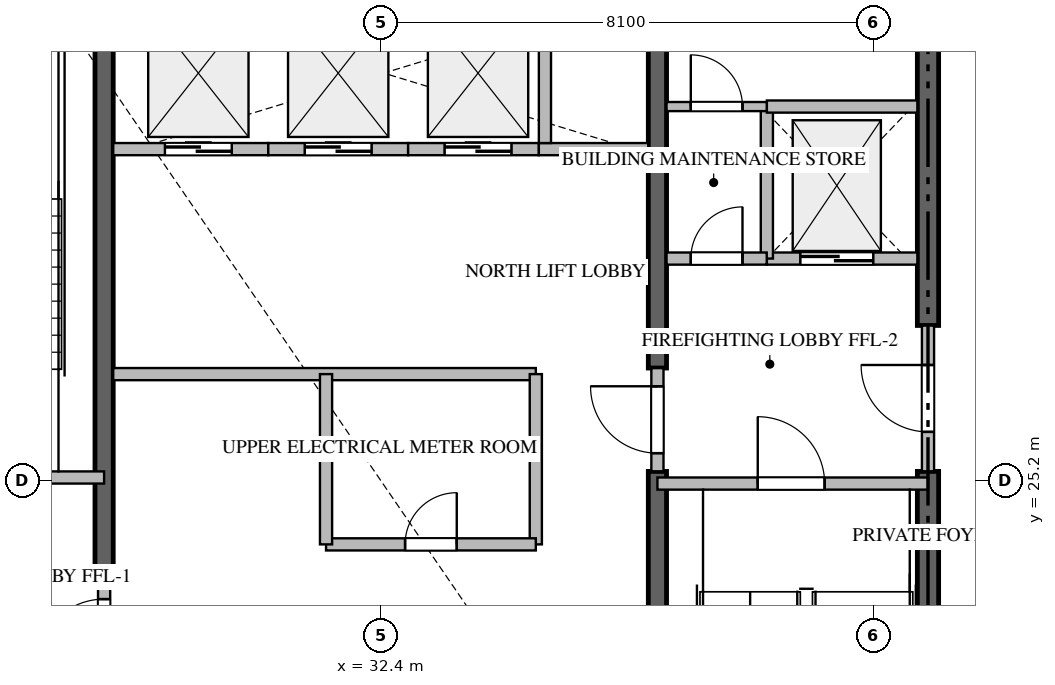
"""IFC4 building model, lengths in metres.
Left out: names, types, materials, properties, quantities, classifications, styles, units other than length and angle.
Written with IfcOpenShell. Run it as: python <this file> out.ifc"""

import sys

from ifc_helpers import new_model, si_unit, direction, frame, frame_2d, origin, place, context, subcontext, project, spatial, rectangle, extrude, source, transform, mapped, element, fill, save


model = new_model("IFC4")
c1 = context("Model", 3, precision=1e-05, world=origin(), true_north=direction((0.0, 1.0)))
c2 = subcontext(c1, "Body", "Model", "MODEL_VIEW")
j1 = project(units=[si_unit("LENGTHUNIT", "METRE"), si_unit("PLANEANGLEUNIT", "RADIAN")], contexts=[c1])
p1 = place(None, origin())
s1 = spatial("IfcSite", under=j1, at=p1, CompositionType="ELEMENT")
p2 = place(p1, origin())
s2 = spatial("IfcBuilding", under=s1, at=p2, CompositionType="ELEMENT")
p3 = place(p2, frame((0.0, 0.0, 321.8)))
s3 = spatial("IfcBuildingStorey", under=s2, at=p3, CompositionType="ELEMENT", Elevation=321.8)
p4 = place(p3, frame((41.4, 16.975, -0.26), z_axis=(0.0, 0.0, 1.0), x_axis=(0.0, 1.0, 0.0)))
e1 = element("IfcWall", 1, at=p4, inside=s3, PredefinedType="SHEAR", context=c2, shape_type="SweptSolid", body=[
    extrude(rectangle(XDim=8.375, YDim=0.35, at=frame_2d((4.188, 0.0))), origin(), (0.0, 0.0, 1.0), 4.048),
])
p5 = place(p3, frame((41.4, 27.75, -0.26), z_axis=(0.0, 0.0, 1.0), x_axis=(0.0, 1.0, 0.0)))
e2 = element("IfcWall", 2, at=p5, inside=s3, PredefinedType="SHEAR", context=c2, shape_type="SweptSolid", body=[
    extrude(rectangle(XDim=5.675, YDim=0.35, at=frame_2d((2.837, 0.0))), origin(), (0.0, 0.0, 1.0), 4.048),
])
p6 = place(p3, frame((27.85, 23.55, -0.26), z_axis=(0.0, 0.0, 1.0), x_axis=(0.0, 1.0, 0.0)))
e3 = element("IfcWall", 3, at=p6, inside=s3, PredefinedType="SHEAR", context=c2, shape_type="SweptSolid", body=[
    extrude(rectangle(XDim=9.875, YDim=0.3, at=frame_2d((4.938, 0.0))), origin(), (0.0, 0.0, 1.0), 4.048),
])
p7 = place(p3, frame((36.95, 16.975, -0.26), z_axis=(0.0, 0.0, 1.0), x_axis=(0.0, 1.0, 0.0)))
e4 = element("IfcWall", 4, at=p7, inside=s3, PredefinedType="SHEAR", context=c2, shape_type="SweptSolid", body=[
    extrude(rectangle(XDim=8.375, YDim=0.3, at=frame_2d((4.188, 0.0))), origin(), (0.0, 0.0, 1.0), 4.048),
])
p8 = place(p3, frame((36.95, 27.05, -0.26), z_axis=(0.0, 0.0, 1.0), x_axis=(0.0, 1.0, 0.0)))
e5 = element("IfcWall", 5, at=p8, inside=s3, PredefinedType="SHEAR", context=c2, shape_type="SweptSolid", body=[
    extrude(rectangle(XDim=6.375, YDim=0.3, at=frame_2d((3.188, 0.0))), origin(), (0.0, 0.0, 1.0), 4.048),
])
p9 = place(p3, frame((23.4, 25.25, 0.0), z_axis=(0.0, 0.0, 1.0), x_axis=(1.0, 0.0, 0.0)))
e6 = element("IfcWall", 6, at=p9, inside=s3, PredefinedType="STANDARD", context=c2, shape_type="SweptSolid", body=[
    extrude(rectangle(XDim=4.45, YDim=0.2, at=frame_2d((2.225, 0.0))), origin(), (0.0, 0.0, 1.0), 3.79),
])
p10 = place(p9, frame((1.65, 0.0, 0.0)))
e7 = element("IfcOpeningElement", 7, at=p10, cuts=e6, PredefinedType="OPENING", context=c2, shape_type="SweptSolid", body=[
    extrude(rectangle(XDim=1.1, YDim=2.15, at=frame_2d((0.55, 1.075))), frame((0.0, 0.11, 0.0), z_axis=(0.0, -1.0, 0.0), x_axis=(1.0, 0.0, 0.0)), (0.0, 0.0, 1.0), 0.22),
])
p11 = place(p3, frame((36.95, 25.15, 0.0), z_axis=(0.0, 0.0, 1.0), x_axis=(1.0, 0.0, 0.0)))
e8 = element("IfcWall", 8, at=p11, inside=s3, PredefinedType="STANDARD", context=c2, shape_type="SweptSolid", body=[
    extrude(rectangle(XDim=4.45, YDim=0.2, at=frame_2d((2.225, 0.0))), origin(), (0.0, 0.0, 1.0), 3.79),
])
p12 = place(p11, frame((1.65, 0.0, 0.0)))
e9 = element("IfcOpeningElement", 9, at=p12, cuts=e8, PredefinedType="OPENING", context=c2, shape_type="SweptSolid", body=[
    extrude(rectangle(XDim=1.1, YDim=2.15, at=frame_2d((0.55, 1.075))), frame((0.0, 0.11, 0.0), z_axis=(0.0, -1.0, 0.0), x_axis=(1.0, 0.0, 0.0)), (0.0, 0.0, 1.0), 0.22),
])
p13 = place(p3, frame((38.75, 28.85, 0.0), z_axis=(0.0, 0.0, 1.0), x_axis=(1.0, 0.0, 0.0)))
e10 = element("IfcWall", 10, at=p13, inside=s3, PredefinedType="STANDARD", context=c2, shape_type="SweptSolid", body=[
    extrude(rectangle(XDim=2.475, YDim=0.2, at=frame_2d((1.238, 0.0))), origin(), (0.0, 0.0, 1.0), 3.79),
])
p14 = place(p13, frame((0.55, 0.0, 0.0)))
e11 = element("IfcOpeningElement", 11, at=p14, cuts=e10, PredefinedType="OPENING", context=c2, shape_type="SweptSolid", body=[
    extrude(rectangle(XDim=1.2, YDim=2.2, at=frame_2d((0.6, 1.1))), frame((0.0, 0.11, 0.0), z_axis=(0.0, -1.0, 0.0), x_axis=(1.0, 0.0, 0.0)), (0.0, 0.0, 1.0), 0.22),
])
p15 = place(p3, frame((28.0, 30.65, 0.0), z_axis=(0.0, 0.0, 1.0), x_axis=(1.0, 0.0, 0.0)))
e12 = element("IfcWall", 12, at=p15, inside=s3, PredefinedType="STANDARD", context=c2, shape_type="SweptSolid", body=[
    extrude(rectangle(XDim=2.55, YDim=0.2, at=frame_2d((1.275, 0.0))), origin(), (0.0, 0.0, 1.0), 3.79),
])
p16 = place(p15, frame((0.85, 0.0, 0.0)))
e13 = element("IfcOpeningElement", 13, at=p16, cuts=e12, PredefinedType="OPENING", context=c2, shape_type="SweptSolid", body=[
    extrude(rectangle(XDim=1.1, YDim=2.2, at=frame_2d((0.55, 1.1))), frame((0.0, 0.11, 0.0), z_axis=(0.0, -1.0, 0.0), x_axis=(1.0, 0.0, 0.0)), (0.0, 0.0, 1.0), 0.22),
])
p17 = place(p3, frame((30.55, 30.65, 0.0), z_axis=(0.0, 0.0, 1.0), x_axis=(1.0, 0.0, 0.0)))
e14 = element("IfcWall", 14, at=p17, inside=s3, PredefinedType="STANDARD", context=c2, shape_type="SweptSolid", body=[
    extrude(rectangle(XDim=2.3, YDim=0.2, at=frame_2d((1.15, 0.0))), origin(), (0.0, 0.0, 1.0), 3.79),
])
p18 = place(p17, frame((0.6, 0.0, 0.0)))
e15 = element("IfcOpeningElement", 15, at=p18, cuts=e14, PredefinedType="OPENING", context=c2, shape_type="SweptSolid", body=[
    extrude(rectangle(XDim=1.1, YDim=2.2, at=frame_2d((0.55, 1.1))), frame((0.0, 0.11, 0.0), z_axis=(0.0, -1.0, 0.0), x_axis=(1.0, 0.0, 0.0)), (0.0, 0.0, 1.0), 0.22),
])
p19 = place(p3, frame((32.85, 30.65, 0.0), z_axis=(0.0, 0.0, 1.0), x_axis=(1.0, 0.0, 0.0)))
e16 = element("IfcWall", 16, at=p19, inside=s3, PredefinedType="STANDARD", context=c2, shape_type="SweptSolid", body=[
    extrude(rectangle(XDim=2.15, YDim=0.2, at=frame_2d((1.075, 0.0))), origin(), (0.0, 0.0, 1.0), 3.79),
])
p20 = place(p19, frame((0.6, 0.0, 0.0)))
e17 = element("IfcOpeningElement", 17, at=p20, cuts=e16, PredefinedType="OPENING", context=c2, shape_type="SweptSolid", body=[
    extrude(rectangle(XDim=1.1, YDim=2.2, at=frame_2d((0.55, 1.1))), frame((0.0, 0.11, 0.0), z_axis=(0.0, -1.0, 0.0), x_axis=(1.0, 0.0, 0.0)), (0.0, 0.0, 1.0), 0.22),
])
p21 = place(p3, frame((35.0, 30.65, 0.0), z_axis=(0.0, 0.0, 1.0), x_axis=(1.0, 0.0, 0.0)))
e18 = element("IfcWall", 18, at=p21, inside=s3, PredefinedType="STANDARD", context=c2, shape_type="SweptSolid", body=[
    extrude(rectangle(XDim=1.8, YDim=0.2, at=frame_2d((0.9, 0.0))), origin(), (0.0, 0.0, 1.0), 3.79),
])
p22 = place(p3, frame((35.1, 30.75, 0.0), z_axis=(0.0, 0.0, 1.0), x_axis=(0.0, 1.0, 0.0)))
e19 = element("IfcWall", 19, at=p22, inside=s3, PredefinedType="STANDARD", context=c2, shape_type="SweptSolid", body=[
    extrude(rectangle(XDim=2.675, YDim=0.2, at=frame_2d((1.337, 0.0))), origin(), (0.0, 0.0, 1.0), 3.79),
])
p23 = place(p3, frame((38.75, 28.85, 0.0), z_axis=(0.0, 0.0, 1.0), x_axis=(0.0, 1.0, 0.0)))
e20 = element("IfcWall", 20, at=p23, inside=s3, PredefinedType="STANDARD", context=c2, shape_type="SweptSolid", body=[
    extrude(rectangle(XDim=2.5, YDim=0.2, at=frame_2d((1.25, 0.0))), origin(), (0.0, 0.0, 1.0), 3.79),
])
p24 = place(p3, frame((38.75, 31.35, 0.0), z_axis=(0.0, 0.0, 1.0), x_axis=(1.0, 0.0, 0.0)))
e21 = element("IfcWall", 21, at=p24, inside=s3, PredefinedType="STANDARD", context=c2, shape_type="SweptSolid", body=[
    extrude(rectangle(XDim=2.475, YDim=0.2, at=frame_2d((1.238, 0.0))), origin(), (0.0, 0.0, 1.0), 3.79),
])
p25 = place(p3, frame((37.1, 28.85, 0.0), z_axis=(0.0, 0.0, 1.0), x_axis=(1.0, 0.0, 0.0)))
e22 = element("IfcWall", 22, at=p25, inside=s3, PredefinedType="STANDARD", context=c2, shape_type="SweptSolid", body=[
    extrude(rectangle(XDim=1.648, YDim=0.2, at=frame_2d((0.824, 0.0))), origin(), (0.0, 0.0, 1.0), 3.79),
])
p26 = place(p25, frame((0.399, 0.0, 0.0)))
e23 = element("IfcOpeningElement", 23, at=p26, cuts=e22, PredefinedType="OPENING", context=c2, shape_type="SweptSolid", body=[
    extrude(rectangle(XDim=0.85, YDim=2.1, at=frame_2d((0.425, 1.05))), frame((0.0, 0.11, 0.0), z_axis=(0.0, -1.0, 0.0), x_axis=(1.0, 0.0, 0.0)), (0.0, 0.0, 1.0), 0.22),
])
p27 = place(p3, frame((41.4, 25.352, 0.0), z_axis=(0.0, 0.0, 1.0), x_axis=(0.0, 1.0, 0.0)))
e24 = element("IfcWall", 24, at=p27, inside=s3, PredefinedType="STANDARD", context=c2, shape_type="SweptSolid", body=[
    extrude(rectangle(XDim=2.396, YDim=0.2, at=frame_2d((1.198, 0.0))), origin(), (0.0, 0.0, 1.0), 3.79),
])
p28 = place(p27, frame((0.648, 0.0, 0.0)))
e25 = element("IfcOpeningElement", 25, at=p28, cuts=e24, PredefinedType="OPENING", context=c2, shape_type="SweptSolid", body=[
    extrude(rectangle(XDim=1.1, YDim=2.15, at=frame_2d((0.55, 1.075))), frame((0.0, 0.11, 0.0), z_axis=(0.0, -1.0, 0.0), x_axis=(1.0, 0.0, 0.0)), (0.0, 0.0, 1.0), 0.22),
])
p29 = place(p3, frame((27.85, 21.852, 0.0), z_axis=(0.0, 0.0, 1.0), x_axis=(0.0, 1.0, 0.0)))
e26 = element("IfcWall", 26, at=p29, inside=s3, PredefinedType="STANDARD", context=c2, shape_type="SweptSolid", body=[
    extrude(rectangle(XDim=1.696, YDim=0.2, at=frame_2d((0.848, 0.0))), origin(), (0.0, 0.0, 1.0), 3.79),
])
p30 = place(p29, frame((0.298, 0.0, 0.0)))
e27 = element("IfcOpeningElement", 27, at=p30, cuts=e26, PredefinedType="OPENING", context=c2, shape_type="SweptSolid", body=[
    extrude(rectangle(XDim=1.1, YDim=2.15, at=frame_2d((0.55, 1.075))), frame((0.0, 0.11, 0.0), z_axis=(0.0, -1.0, 0.0), x_axis=(1.0, 0.0, 0.0)), (0.0, 0.0, 1.0), 0.22),
])
p31 = place(p3, frame((36.95, 25.352, 0.0), z_axis=(0.0, 0.0, 1.0), x_axis=(0.0, 1.0, 0.0)))
e28 = element("IfcWall", 28, at=p31, inside=s3, PredefinedType="STANDARD", context=c2, shape_type="SweptSolid", body=[
    extrude(rectangle(XDim=1.696, YDim=0.2, at=frame_2d((0.848, 0.0))), origin(), (0.0, 0.0, 1.0), 3.79),
])
p32 = place(p31, frame((0.298, 0.0, 0.0)))
e29 = element("IfcOpeningElement", 29, at=p32, cuts=e28, PredefinedType="OPENING", context=c2, shape_type="SweptSolid", body=[
    extrude(rectangle(XDim=1.1, YDim=2.15, at=frame_2d((0.55, 1.075))), frame((0.0, 0.11, 0.0), z_axis=(0.0, -1.0, 0.0), x_axis=(1.0, 0.0, 0.0)), (0.0, 0.0, 1.0), 0.22),
])
p33 = place(p3, frame((37.1, 31.35, 0.0), z_axis=(0.0, 0.0, 1.0), x_axis=(1.0, 0.0, 0.0)))
e30 = element("IfcWall", 30, at=p33, inside=s3, PredefinedType="PARTITIONING", context=c2, shape_type="SweptSolid", body=[
    extrude(rectangle(XDim=1.648, YDim=0.15, at=frame_2d((0.824, 0.0))), origin(), (0.0, 0.0, 1.0), 3.79),
])
p34 = place(p33, frame((0.399, 0.0, 0.0)))
e31 = element("IfcOpeningElement", 31, at=p34, cuts=e30, PredefinedType="OPENING", context=c2, shape_type="SweptSolid", body=[
    extrude(rectangle(XDim=0.85, YDim=2.1, at=frame_2d((0.425, 1.05))), frame((0.0, 0.085, 0.0), z_axis=(0.0, -1.0, 0.0), x_axis=(1.0, 0.0, 0.0)), (0.0, 0.0, 1.0), 0.17),
])
p35 = place(p3, frame((28.0, 26.95, 0.0), z_axis=(0.0, 0.0, 1.0), x_axis=(1.0, 0.0, 0.0)))
e32 = element("IfcWall", 32, at=p35, inside=s3, PredefinedType="STANDARD", context=c2, shape_type="SweptSolid", body=[
    extrude(rectangle(XDim=6.95, YDim=0.2, at=frame_2d((3.475, 0.0))), origin(), (0.0, 0.0, 1.0), 3.79),
])
p36 = place(p3, frame((34.95, 24.15, 0.0), z_axis=(0.0, 0.0, 1.0), x_axis=(0.0, 1.0, 0.0)))
e33 = element("IfcWall", 33, at=p36, inside=s3, PredefinedType="STANDARD", context=c2, shape_type="SweptSolid", body=[
    extrude(rectangle(XDim=2.8, YDim=0.2, at=frame_2d((1.4, 0.0))), origin(), (0.0, 0.0, 1.0), 3.79),
])
p37 = place(p3, frame((31.5, 24.15, 0.0), z_axis=(0.0, 0.0, 1.0), x_axis=(1.0, 0.0, 0.0)))
e34 = element("IfcWall", 34, at=p37, inside=s3, PredefinedType="STANDARD", context=c2, shape_type="SweptSolid", body=[
    extrude(rectangle(XDim=3.45, YDim=0.2, at=frame_2d((1.725, 0.0))), origin(), (0.0, 0.0, 1.0), 3.79),
])
p38 = place(p37, frame((1.3, 0.0, 0.0)))
e35 = element("IfcOpeningElement", 35, at=p38, cuts=e34, PredefinedType="OPENING", context=c2, shape_type="SweptSolid", body=[
    extrude(rectangle(XDim=0.85, YDim=2.1, at=frame_2d((0.425, 1.05))), frame((0.0, 0.11, 0.0), z_axis=(0.0, -1.0, 0.0), x_axis=(1.0, 0.0, 0.0)), (0.0, 0.0, 1.0), 0.22),
])
p39 = place(p3, frame((31.5, 24.15, 0.0), z_axis=(0.0, 0.0, 1.0), x_axis=(0.0, 1.0, 0.0)))
e36 = element("IfcWall", 36, at=p39, inside=s3, PredefinedType="STANDARD", context=c2, shape_type="SweptSolid", body=[
    extrude(rectangle(XDim=2.8, YDim=0.2, at=frame_2d((1.4, 0.0))), origin(), (0.0, 0.0, 1.0), 3.79),
])
m1 = source(origin(), c2, "Body", "SweptSolid", [
    extrude(rectangle(XDim=1.1, YDim=2.15, at=frame_2d((0.55, 1.075))), frame((0.0, 0.025, 0.0), z_axis=(0.0, -1.0, 0.0), x_axis=(1.0, 0.0, 0.0)), (0.0, 0.0, 1.0), 0.05),
])
p40 = place(p12, origin())
e37 = element("IfcDoor", 37, at=p40, inside=s3, OperationType="SINGLE_SWING_LEFT", PredefinedType="DOOR", context=c2, shape_type="MappedRepresentation", body=[
    mapped(m1, transform((0.0, 0.0, 0.0), scale=1.0)),
])
fill(e9, e37)
m2 = source(origin(), c2, "Body", "SweptSolid", [
    extrude(rectangle(XDim=1.2, YDim=2.2, at=frame_2d((0.6, 1.1))), frame((0.0, 0.025, 0.0), z_axis=(0.0, -1.0, 0.0), x_axis=(1.0, 0.0, 0.0)), (0.0, 0.0, 1.0), 0.05),
])
p41 = place(p14, origin())
e38 = element("IfcDoor", 38, at=p41, inside=s3, OperationType="DOUBLE_DOOR_SLIDING", PredefinedType="DOOR", context=c2, shape_type="MappedRepresentation", body=[
    mapped(m2, transform((0.0, 0.0, 0.0), scale=1.0)),
])
fill(e11, e38)
m3 = source(origin(), c2, "Body", "SweptSolid", [
    extrude(rectangle(XDim=1.1, YDim=2.2, at=frame_2d((0.55, 1.1))), frame((0.0, 0.025, 0.0), z_axis=(0.0, -1.0, 0.0), x_axis=(1.0, 0.0, 0.0)), (0.0, 0.0, 1.0), 0.05),
])
p42 = place(p16, origin())
e39 = element("IfcDoor", 39, at=p42, inside=s3, OperationType="DOUBLE_DOOR_SLIDING", PredefinedType="DOOR", context=c2, shape_type="MappedRepresentation", body=[
    mapped(m3, transform((0.0, 0.0, 0.0), scale=1.0)),
])
fill(e13, e39)
p43 = place(p18, origin())
e40 = element("IfcDoor", 40, at=p43, inside=s3, OperationType="DOUBLE_DOOR_SLIDING", PredefinedType="DOOR", context=c2, shape_type="MappedRepresentation", body=[
    mapped(m3, transform((0.0, 0.0, 0.0), scale=1.0)),
])
fill(e15, e40)
p44 = place(p20, origin())
e41 = element("IfcDoor", 41, at=p44, inside=s3, OperationType="DOUBLE_DOOR_SLIDING", PredefinedType="DOOR", context=c2, shape_type="MappedRepresentation", body=[
    mapped(m3, transform((0.0, 0.0, 0.0), scale=1.0)),
])
fill(e17, e41)
m4 = source(origin(), c2, "Body", "SweptSolid", [
    extrude(rectangle(XDim=0.85, YDim=2.1, at=frame_2d((0.425, 1.05))), frame((0.0, 0.025, 0.0), z_axis=(0.0, -1.0, 0.0), x_axis=(1.0, 0.0, 0.0)), (0.0, 0.0, 1.0), 0.05),
])
p45 = place(p26, origin())
e42 = element("IfcDoor", 42, at=p45, inside=s3, OperationType="SINGLE_SWING_RIGHT", PredefinedType="DOOR", context=c2, shape_type="MappedRepresentation", body=[
    mapped(m4, transform((0.0, 0.0, 0.0), scale=1.0)),
])
fill(e23, e42)
p46 = place(p28, origin())
e43 = element("IfcDoor", 43, at=p46, inside=s3, OperationType="SINGLE_SWING_RIGHT", PredefinedType="DOOR", context=c2, shape_type="MappedRepresentation", body=[
    mapped(m1, transform((0.0, 0.0, 0.0), scale=1.0)),
])
fill(e25, e43)
p47 = place(p30, origin())
e44 = element("IfcDoor", 44, at=p47, inside=s3, OperationType="SINGLE_SWING_LEFT", PredefinedType="DOOR", context=c2, shape_type="MappedRepresentation", body=[
    mapped(m1, transform((0.0, 0.0, 0.0), scale=1.0)),
])
fill(e27, e44)
p48 = place(p32, origin())
e45 = element("IfcDoor", 45, at=p48, inside=s3, OperationType="SINGLE_SWING_RIGHT", PredefinedType="DOOR", context=c2, shape_type="MappedRepresentation", body=[
    mapped(m1, transform((0.0, 0.0, 0.0), scale=1.0)),
])
fill(e29, e45)
p49 = place(p34, origin())
e46 = element("IfcDoor", 46, at=p49, inside=s3, OperationType="SINGLE_SWING_LEFT", PredefinedType="DOOR", context=c2, shape_type="MappedRepresentation", body=[
    mapped(m4, transform((0.0, 0.0, 0.0), scale=1.0)),
])
fill(e31, e46)
p50 = place(p38, origin())
e47 = element("IfcDoor", 47, at=p50, inside=s3, OperationType="SINGLE_SWING_RIGHT", PredefinedType="DOOR", context=c2, shape_type="MappedRepresentation", body=[
    mapped(m4, transform((0.0, 0.0, 0.0), scale=1.0)),
])
fill(e35, e47)
save(model, sys.argv[1])
